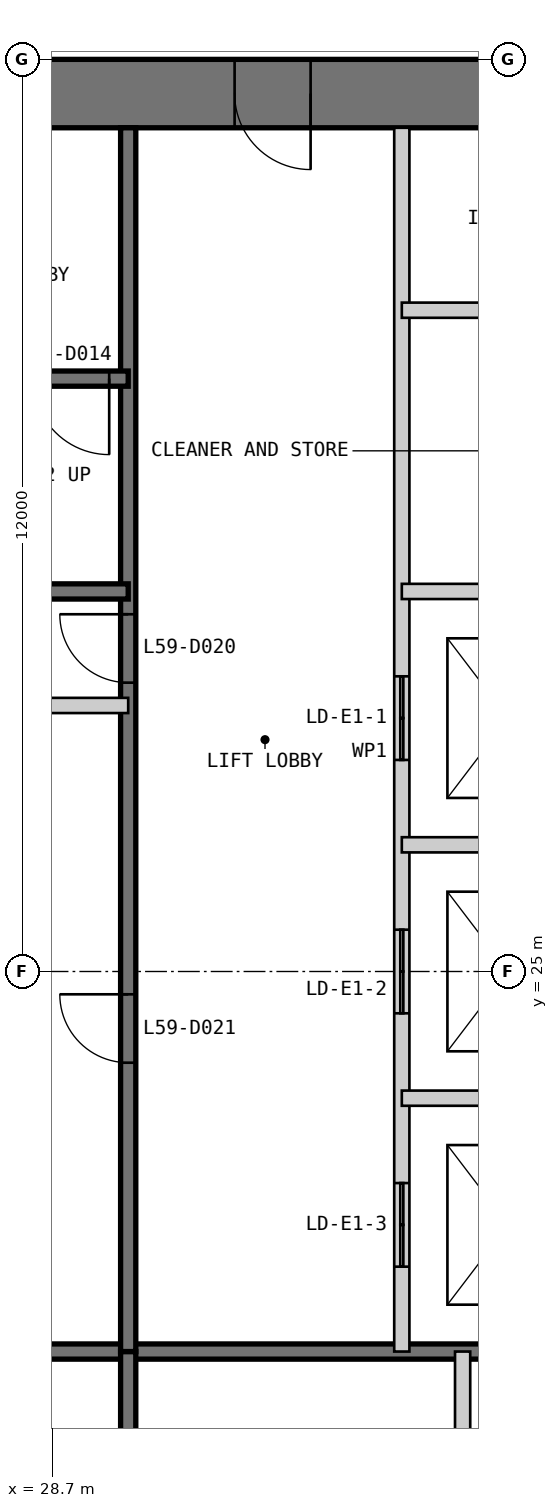
"""IFC4 building model, lengths in metres.
Left out: names, types, materials, properties, quantities, classifications, styles, units other than length and angle.
Written with IfcOpenShell. Run it as: python <this file> out.ifc"""

import sys

from ifc_helpers import new_model, si_unit, direction, frame, frame_2d, origin, place, context, subcontext, project, spatial, polyline, rectangle, outline, extrude, element, fill, save


model = new_model("IFC4")
c1 = context("Model", 3, precision=1e-05, world=origin(), true_north=direction((0.0, 1.0)))
c2 = subcontext(c1, "Body", "Model", "MODEL_VIEW")
j1 = project(units=[si_unit("LENGTHUNIT", "METRE"), si_unit("PLANEANGLEUNIT", "RADIAN")], contexts=[c1])
p1 = place(None, origin())
s1 = spatial("IfcSite", under=j1, at=p1, CompositionType="ELEMENT")
p2 = place(p1, origin())
s2 = spatial("IfcBuilding", under=s1, at=p2, CompositionType="ELEMENT")
p3 = place(p2, frame((0.0, 0.0, 252.6)))
s3 = spatial("IfcBuildingStorey", under=s2, at=p3, CompositionType="ELEMENT", Elevation=252.6)
p4 = place(p3, frame((37.0, 36.55, 0.0), z_axis=(0.0, 0.0, 1.0), x_axis=(-1.0, 0.0, 0.0)))
e1 = element("IfcWall", 1, at=p4, inside=s3, PredefinedType="SHEAR", context=c2, shape_type="SweptSolid", body=[
    extrude(outline(polyline([(0.0, -0.45), (24.0, -0.45), (23.1, 0.45), (0.9, 0.45), (0.0, -0.45)])), origin(), (0.0, 0.0, 1.0), 3.4),
])
p5 = place(p4, frame((4.9, 0.0, 0.0)))
e2 = element("IfcOpeningElement", 2, at=p5, cuts=e1, PredefinedType="OPENING", context=c2, shape_type="SweptSolid", body=[
    extrude(rectangle(XDim=1.0, YDim=2.2, at=frame_2d((0.5, 1.1))), frame((0.0, 0.46, 0.0), z_axis=(0.0, -1.0, 0.0), x_axis=(1.0, 0.0, 0.0)), (0.0, 0.0, 1.0), 0.92),
])
p6 = place(p4, frame((8.9, 0.0, 0.0)))
e3 = element("IfcOpeningElement", 3, at=p6, cuts=e1, PredefinedType="OPENING", context=c2, shape_type="SweptSolid", body=[
    extrude(rectangle(XDim=1.1, YDim=2.2, at=frame_2d((0.55, 1.1))), frame((0.0, 0.46, 0.0), z_axis=(0.0, -1.0, 0.0), x_axis=(1.0, 0.0, 0.0)), (0.0, 0.0, 1.0), 0.92),
])
p7 = place(p4, frame((15.05, 0.0, 0.0)))
e4 = element("IfcOpeningElement", 4, at=p7, cuts=e1, PredefinedType="OPENING", context=c2, shape_type="SweptSolid", body=[
    extrude(rectangle(XDim=0.9, YDim=2.2, at=frame_2d((0.45, 1.1))), frame((0.0, 0.46, 0.0), z_axis=(0.0, -1.0, 0.0), x_axis=(1.0, 0.0, 0.0)), (0.0, 0.0, 1.0), 0.92),
])
p8 = place(p4, frame((17.9, 0.0, 0.0)))
e5 = element("IfcOpeningElement", 5, at=p8, cuts=e1, PredefinedType="OPENING", context=c2, shape_type="SweptSolid", body=[
    extrude(rectangle(XDim=1.0, YDim=2.2, at=frame_2d((0.5, 1.1))), frame((0.0, 0.46, 0.0), z_axis=(0.0, -1.0, 0.0), x_axis=(1.0, 0.0, 0.0)), (0.0, 0.0, 1.0), 0.92),
])
p9 = place(p4, frame((21.4, 0.0, 0.0)))
e6 = element("IfcOpeningElement", 6, at=p9, cuts=e1, PredefinedType="OPENING", context=c2, shape_type="SweptSolid", body=[
    extrude(rectangle(XDim=1.0, YDim=2.2, at=frame_2d((0.5, 1.1))), frame((0.0, 0.46, 0.0), z_axis=(0.0, -1.0, 0.0), x_axis=(1.0, 0.0, 0.0)), (0.0, 0.0, 1.0), 0.92),
])
p10 = place(p3, frame((20.3, 20.0, 0.0), z_axis=(0.0, 0.0, 1.0), x_axis=(1.0, 0.0, 0.0)))
e7 = element("IfcWall", 7, at=p10, inside=s3, PredefinedType="SOLIDWALL", context=c2, shape_type="SweptSolid", body=[
    extrude(rectangle(XDim=15.8, YDim=0.2, at=frame_2d((7.9, 0.0))), origin(), (0.0, 0.0, 1.0), 3.2),
])
p11 = place(p3, frame((29.7, 13.9, 0.0), z_axis=(0.0, 0.0, 1.0), x_axis=(0.0, 1.0, 0.0)))
e8 = element("IfcWall", 8, at=p11, inside=s3, PredefinedType="SOLIDWALL", context=c2, shape_type="SweptSolid", body=[
    extrude(rectangle(XDim=6.1, YDim=0.2, at=frame_2d((3.05, 0.0))), origin(), (0.0, 0.0, 1.0), 3.2),
])
p12 = place(p3, frame((34.1, 13.9, 0.0), z_axis=(0.0, 0.0, 1.0), x_axis=(0.0, 1.0, 0.0)))
e9 = element("IfcWall", 9, at=p12, inside=s3, PredefinedType="PARTITIONING", context=c2, shape_type="SweptSolid", body=[
    extrude(rectangle(XDim=6.1, YDim=0.2, at=frame_2d((3.05, 0.0))), origin(), (0.0, 0.0, 1.0), 3.2),
])
p13 = place(p3, frame((33.3, 36.1, 0.0), z_axis=(0.0, 0.0, 1.0), x_axis=(0.0, -1.0, 0.0)))
e10 = element("IfcWall", 10, at=p13, inside=s3, PredefinedType="PARTITIONING", context=c2, shape_type="SweptSolid", body=[
    extrude(rectangle(XDim=16.1, YDim=0.2, at=frame_2d((8.05, 0.0))), origin(), (0.0, 0.0, 1.0), 3.2),
])
p14 = place(p13, frame((7.217, 0.0, 0.0)))
e11 = element("IfcOpeningElement", 11, at=p14, cuts=e10, PredefinedType="OPENING", context=c2, shape_type="SweptSolid", body=[
    extrude(rectangle(XDim=1.1, YDim=2.2, at=frame_2d((0.55, 1.1))), frame((0.0, 0.11, 0.0), z_axis=(0.0, -1.0, 0.0), x_axis=(1.0, 0.0, 0.0)), (0.0, 0.0, 1.0), 0.22),
])
p15 = place(p13, frame((10.55, 0.0, 0.0)))
e12 = element("IfcOpeningElement", 12, at=p15, cuts=e10, PredefinedType="OPENING", context=c2, shape_type="SweptSolid", body=[
    extrude(rectangle(XDim=1.1, YDim=2.2, at=frame_2d((0.55, 1.1))), frame((0.0, 0.11, 0.0), z_axis=(0.0, -1.0, 0.0), x_axis=(1.0, 0.0, 0.0)), (0.0, 0.0, 1.0), 0.22),
])
p16 = place(p13, frame((13.883, 0.0, 0.0)))
e13 = element("IfcOpeningElement", 13, at=p16, cuts=e10, PredefinedType="OPENING", context=c2, shape_type="SweptSolid", body=[
    extrude(rectangle(XDim=1.1, YDim=2.2, at=frame_2d((0.55, 1.1))), frame((0.0, 0.11, 0.0), z_axis=(0.0, -1.0, 0.0), x_axis=(1.0, 0.0, 0.0)), (0.0, 0.0, 1.0), 0.22),
])
p17 = place(p3, frame((29.7, 36.1, 0.0), z_axis=(0.0, 0.0, 1.0), x_axis=(0.0, -1.0, 0.0)))
e14 = element("IfcWall", 14, at=p17, inside=s3, PredefinedType="SOLIDWALL", context=c2, shape_type="SweptSolid", body=[
    extrude(rectangle(XDim=16.1, YDim=0.2, at=frame_2d((8.05, 0.0))), origin(), (0.0, 0.0, 1.0), 3.2),
])
p18 = place(p17, frame((6.4, 0.0, 0.0)))
e15 = element("IfcOpeningElement", 15, at=p18, cuts=e14, PredefinedType="OPENING", context=c2, shape_type="SweptSolid", body=[
    extrude(rectangle(XDim=0.9, YDim=2.2, at=frame_2d((0.45, 1.1))), frame((0.0, 0.11, 0.0), z_axis=(0.0, -1.0, 0.0), x_axis=(1.0, 0.0, 0.0)), (0.0, 0.0, 1.0), 0.22),
])
p19 = place(p17, frame((11.4, 0.0, 0.0)))
e16 = element("IfcOpeningElement", 16, at=p19, cuts=e14, PredefinedType="OPENING", context=c2, shape_type="SweptSolid", body=[
    extrude(rectangle(XDim=0.9, YDim=2.2, at=frame_2d((0.45, 1.1))), frame((0.0, 0.11, 0.0), z_axis=(0.0, -1.0, 0.0), x_axis=(1.0, 0.0, 0.0)), (0.0, 0.0, 1.0), 0.22),
])
for number, where, z_axis, x_axis in (
    (17, (36.1, 30.0, 0.0), (0.0, 0.0, 1.0), (-1.0, 0.0, 0.0)),
    (18, (36.1, 26.667, 0.0), (0.0, 0.0, 1.0), (-1.0, 0.0, 0.0)),
    (19, (36.1, 23.333, 0.0), (0.0, 0.0, 1.0), (-1.0, 0.0, 0.0)),
):
    element("IfcWall", number, at=place(p3, frame(where, z_axis=z_axis, x_axis=x_axis)), inside=s3, PredefinedType="PARTITIONING", context=c2, shape_type="SweptSolid", body=[
        extrude(rectangle(XDim=2.8, YDim=0.2, at=frame_2d((1.4, 0.0))), origin(), (0.0, 0.0, 1.0), 3.2),
    ])
p20 = place(p3, frame((29.7, 32.8, 0.0), z_axis=(0.0, 0.0, 1.0), x_axis=(-1.0, 0.0, 0.0)))
e20 = element("IfcWall", 20, at=p20, inside=s3, PredefinedType="SOLIDWALL", context=c2, shape_type="SweptSolid", body=[
    extrude(rectangle(XDim=9.4, YDim=0.2, at=frame_2d((4.7, 0.0))), origin(), (0.0, 0.0, 1.0), 3.2),
])
p21 = place(p20, frame((0.25, 0.0, 0.0)))
e21 = element("IfcOpeningElement", 21, at=p21, cuts=e20, PredefinedType="OPENING", context=c2, shape_type="SweptSolid", body=[
    extrude(rectangle(XDim=1.0, YDim=2.2, at=frame_2d((0.5, 1.1))), frame((0.0, 0.11, 0.0), z_axis=(0.0, -1.0, 0.0), x_axis=(1.0, 0.0, 0.0)), (0.0, 0.0, 1.0), 0.22),
])
p22 = place(p3, frame((29.7, 30.0, 0.0), z_axis=(0.0, 0.0, 1.0), x_axis=(-1.0, 0.0, 0.0)))
e22 = element("IfcWall", 22, at=p22, inside=s3, PredefinedType="SOLIDWALL", context=c2, shape_type="SweptSolid", body=[
    extrude(rectangle(XDim=15.8, YDim=0.2, at=frame_2d((7.9, 0.0))), origin(), (0.0, 0.0, 1.0), 3.2),
])
for number, where, z_axis, x_axis in (
    (23, (36.1, 33.7, 0.0), (0.0, 0.0, 1.0), (-1.0, 0.0, 0.0)),
    (24, (29.7, 28.5, 0.0), (0.0, 0.0, 1.0), (-1.0, 0.0, 0.0)),
):
    element("IfcWall", number, at=place(p3, frame(where, z_axis=z_axis, x_axis=x_axis)), inside=s3, PredefinedType="PARTITIONING", context=c2, shape_type="SweptSolid", body=[
        extrude(rectangle(XDim=2.8, YDim=0.2, at=frame_2d((1.4, 0.0))), origin(), (0.0, 0.0, 1.0), 3.2),
    ])
p23 = place(p5, origin())
e25 = element("IfcDoor", 25, at=p23, inside=s3, OperationType="SINGLE_SWING_LEFT", PredefinedType="DOOR", context=c2, shape_type="SweptSolid", body=[
    extrude(rectangle(XDim=1.0, YDim=2.2, at=frame_2d((0.5, 1.1))), frame((0.0, 0.025, 0.0), z_axis=(0.0, -1.0, 0.0), x_axis=(1.0, 0.0, 0.0)), (0.0, 0.0, 1.0), 0.05),
    extrude(outline(polyline([(0.0, 0.0), (0.04, 0.0), (0.04, 2.16), (0.96, 2.16), (0.96, 0.0), (1.0, 0.0), (1.0, 2.2), (0.0, 2.2), (0.0, 0.0)])), frame((0.0, 0.3, 0.0), z_axis=(0.0, -1.0, 0.0), x_axis=(1.0, 0.0, 0.0)), (0.0, 0.0, 1.0), 0.6),
])
fill(e2, e25)
p24 = place(p21, origin())
e26 = element("IfcDoor", 26, at=p24, inside=s3, OperationType="SINGLE_SWING_LEFT", PredefinedType="DOOR", context=c2, shape_type="SweptSolid", body=[
    extrude(rectangle(XDim=1.0, YDim=2.2, at=frame_2d((0.5, 1.1))), frame((0.0, 0.025, 0.0), z_axis=(0.0, -1.0, 0.0), x_axis=(1.0, 0.0, 0.0)), (0.0, 0.0, 1.0), 0.05),
])
fill(e21, e26)
p25 = place(p18, frame((0.9, 0.0, 0.0), z_axis=(0.0, 0.0, 1.0), x_axis=(-1.0, 0.0, 0.0)))
e27 = element("IfcDoor", 27, at=p25, inside=s3, OperationType="SINGLE_SWING_RIGHT", PredefinedType="DOOR", context=c2, shape_type="SweptSolid", body=[
    extrude(rectangle(XDim=0.9, YDim=2.2, at=frame_2d((0.45, 1.1))), frame((0.0, 0.025, 0.0), z_axis=(0.0, -1.0, 0.0), x_axis=(1.0, 0.0, 0.0)), (0.0, 0.0, 1.0), 0.05),
])
fill(e15, e27)
p26 = place(p19, frame((0.9, 0.0, 0.0), z_axis=(0.0, 0.0, 1.0), x_axis=(-1.0, 0.0, 0.0)))
e28 = element("IfcDoor", 28, at=p26, inside=s3, OperationType="SINGLE_SWING_RIGHT", PredefinedType="DOOR", context=c2, shape_type="SweptSolid", body=[
    extrude(rectangle(XDim=0.9, YDim=2.2, at=frame_2d((0.45, 1.1))), frame((0.0, 0.025, 0.0), z_axis=(0.0, -1.0, 0.0), x_axis=(1.0, 0.0, 0.0)), (0.0, 0.0, 1.0), 0.05),
])
fill(e16, e28)
p27 = place(p14, origin())
e29 = element("IfcDoor", 29, at=p27, inside=s3, OperationType="DOUBLE_DOOR_SLIDING", PredefinedType="DOOR", context=c2, shape_type="SweptSolid", body=[
    extrude(rectangle(XDim=1.1, YDim=2.2, at=frame_2d((0.55, 1.1))), frame((0.0, 0.025, 0.0), z_axis=(0.0, -1.0, 0.0), x_axis=(1.0, 0.0, 0.0)), (0.0, 0.0, 1.0), 0.05),
])
fill(e11, e29)
p28 = place(p15, origin())
e30 = element("IfcDoor", 30, at=p28, inside=s3, OperationType="DOUBLE_DOOR_SLIDING", PredefinedType="DOOR", context=c2, shape_type="SweptSolid", body=[
    extrude(rectangle(XDim=1.1, YDim=2.2, at=frame_2d((0.55, 1.1))), frame((0.0, 0.025, 0.0), z_axis=(0.0, -1.0, 0.0), x_axis=(1.0, 0.0, 0.0)), (0.0, 0.0, 1.0), 0.05),
])
fill(e12, e30)
p29 = place(p16, origin())
e31 = element("IfcDoor", 31, at=p29, inside=s3, OperationType="DOUBLE_DOOR_SLIDING", PredefinedType="DOOR", context=c2, shape_type="SweptSolid", body=[
    extrude(rectangle(XDim=1.1, YDim=2.2, at=frame_2d((0.55, 1.1))), frame((0.0, 0.025, 0.0), z_axis=(0.0, -1.0, 0.0), x_axis=(1.0, 0.0, 0.0)), (0.0, 0.0, 1.0), 0.05),
])
fill(e13, e31)
save(model, sys.argv[1])
